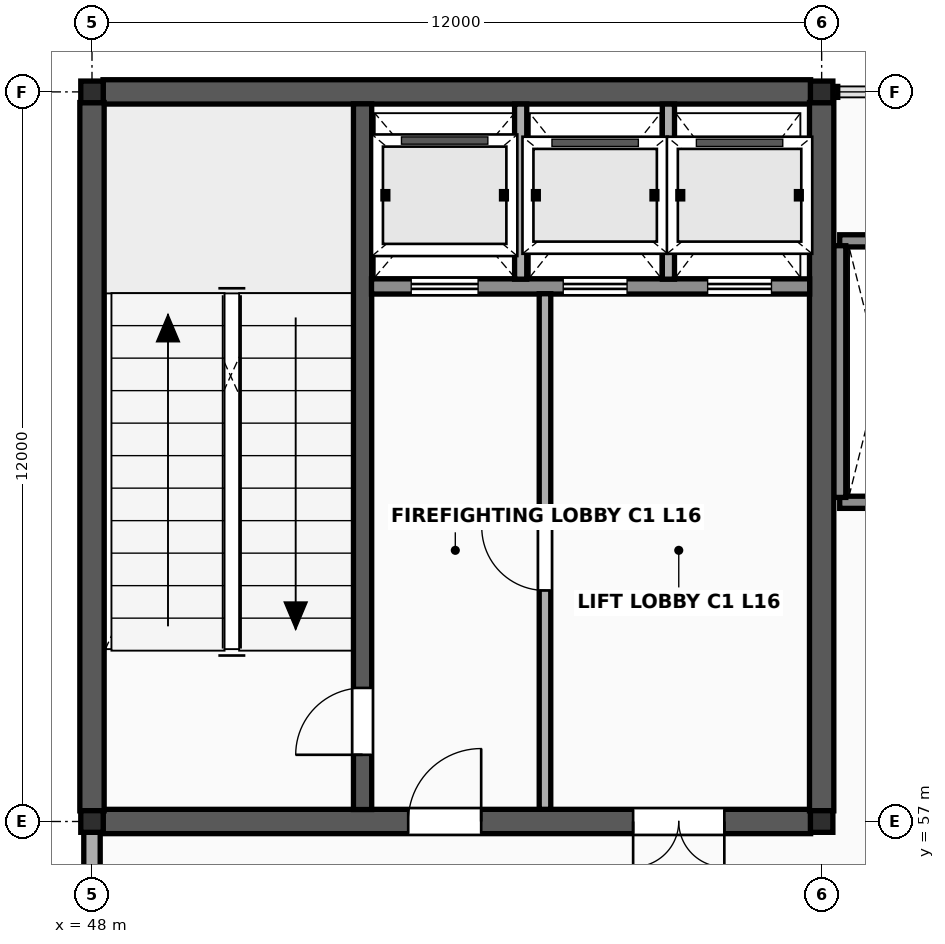
"""IFC4 building model, lengths in metres.
Left out: names, types, materials, properties, quantities, classifications, styles, units other than length and angle.
Written with IfcOpenShell. Run it as: python <this file> out.ifc"""

import sys

from ifc_helpers import new_model, si_unit, direction, frame, frame_2d, origin, origin_2d, place, context, subcontext, project, spatial, rectangle, i_section, extrude, element, fill, save


model = new_model("IFC4")
c1 = context("Model", 3, precision=1e-05, world=origin(), true_north=direction((0.0, 1.0)))
c2 = subcontext(c1, "Body", "Model", "MODEL_VIEW")
j1 = project(units=[si_unit("LENGTHUNIT", "METRE"), si_unit("PLANEANGLEUNIT", "RADIAN")], contexts=[c1])
p1 = place(None, origin())
s1 = spatial("IfcSite", under=j1, at=p1, CompositionType="ELEMENT")
p2 = place(p1, origin())
s2 = spatial("IfcBuilding", under=s1, at=p2, CompositionType="ELEMENT")
p3 = place(p2, frame((0.0, 0.0, 65.6)))
s3 = spatial("IfcBuildingStorey", under=s2, at=p3, CompositionType="ELEMENT", Elevation=65.6)
for number, where, z_axis, x_axis in (
    (1, (48.0, 57.0, 0.0), (0.0, 0.0, 1.0), (1.0, 0.0, 0.0)),
    (2, (48.0, 69.0, 0.0), (0.0, 0.0, 1.0), (1.0, 0.0, 0.0)),
    (3, (60.0, 57.0, 0.0), (0.0, 0.0, 1.0), (1.0, 0.0, 0.0)),
    (4, (60.0, 69.0, 0.0), (0.0, 0.0, 1.0), (1.0, 0.0, 0.0)),
):
    element("IfcColumn", number, at=place(p3, frame(where, z_axis=z_axis, x_axis=x_axis)), inside=s3, PredefinedType="COLUMN", context=c2, shape_type="SweptSolid", body=[
        extrude(i_section(OverallWidth=0.369, OverallDepth=0.356, WebThickness=0.011, FlangeThickness=0.018, FilletRadius=0.018, at=origin_2d()), origin(), (0.0, 0.0, 1.0), 4.0),
    ])
for number, where, z_axis, x_axis in (
    (5, (60.297, 62.25, 0.0), (0.0, 0.0, 1.0), (1.0, 0.0, 0.0)),
    (6, (60.297, 66.55, 0.0), (0.0, 0.0, 1.0), (1.0, 0.0, 0.0)),
):
    element("IfcWall", number, at=place(p3, frame(where, z_axis=z_axis, x_axis=x_axis)), inside=s3, PredefinedType="SOLIDWALL", context=c2, shape_type="SweptSolid", body=[
        extrude(rectangle(XDim=1.283, YDim=0.2, at=frame_2d((0.642, 0.0))), origin(), (0.0, 0.0, 1.0), 3.793),
    ])
p4 = place(p3, frame((60.297, 62.33, 0.0), z_axis=(0.0, 0.0, 1.0), x_axis=(0.0, 1.0, 0.0)))
e7 = element("IfcWall", 7, at=p4, inside=s3, PredefinedType="SOLIDWALL", context=c2, shape_type="SweptSolid", body=[
    extrude(rectangle(XDim=4.14, YDim=0.2, at=frame_2d((2.07, 0.0))), origin(), (0.0, 0.0, 1.0), 3.793),
])
p5 = place(p3, frame((48.181, 57.0, 0.0), z_axis=(0.0, 0.0, 1.0), x_axis=(1.0, 0.0, 0.0)))
e8 = element("IfcWall", 8, at=p5, inside=s3, PredefinedType="SHEAR", context=c2, shape_type="SweptSolid", body=[
    extrude(rectangle(XDim=11.637, YDim=0.4, at=frame_2d((5.819, 0.0))), origin(), (0.0, 0.0, 1.0), 3.793),
])
p6 = place(p5, frame((5.019, 0.0, 0.0)))
e9 = element("IfcOpeningElement", 9, at=p6, cuts=e8, PredefinedType="OPENING", context=c2, shape_type="SweptSolid", body=[
    extrude(rectangle(XDim=1.2, YDim=2.2, at=frame_2d((0.6, 1.1))), frame((0.0, 0.215, 0.0), z_axis=(0.0, -1.0, 0.0), x_axis=(1.0, 0.0, 0.0)), (0.0, 0.0, 1.0), 0.43),
])
p7 = place(p5, frame((8.718, 0.0, 0.0)))
e10 = element("IfcOpeningElement", 10, at=p7, cuts=e8, PredefinedType="OPENING", context=c2, shape_type="SweptSolid", body=[
    extrude(rectangle(XDim=1.5, YDim=2.25, at=frame_2d((0.75, 1.125))), frame((0.0, 0.215, 0.0), z_axis=(0.0, -1.0, 0.0), x_axis=(1.0, 0.0, 0.0)), (0.0, 0.0, 1.0), 0.43),
])
p8 = place(p3, frame((48.181, 69.0, 0.0), z_axis=(0.0, 0.0, 1.0), x_axis=(1.0, 0.0, 0.0)))
e11 = element("IfcWall", 11, at=p8, inside=s3, PredefinedType="SHEAR", context=c2, shape_type="SweptSolid", body=[
    extrude(rectangle(XDim=11.637, YDim=0.4, at=frame_2d((5.819, 0.0))), origin(), (0.0, 0.0, 1.0), 3.793),
])
for number, where, z_axis, x_axis in (
    (12, (48.0, 57.175, 0.0), (0.0, 0.0, 1.0), (0.0, 1.0, 0.0)),
    (13, (60.0, 57.175, 0.0), (0.0, 0.0, 1.0), (0.0, 1.0, 0.0)),
):
    element("IfcWall", number, at=place(p3, frame(where, z_axis=z_axis, x_axis=x_axis)), inside=s3, PredefinedType="SHEAR", context=c2, shape_type="SweptSolid", body=[
        extrude(rectangle(XDim=11.65, YDim=0.4, at=frame_2d((5.825, 0.0))), origin(), (0.0, 0.0, 1.0), 3.793),
    ])
p9 = place(p3, frame((52.45, 57.197, 0.0), z_axis=(0.0, 0.0, 1.0), x_axis=(0.0, 1.0, 0.0)))
e14 = element("IfcWall", 14, at=p9, inside=s3, PredefinedType="SHEAR", context=c2, shape_type="SweptSolid", body=[
    extrude(rectangle(XDim=11.606, YDim=0.3, at=frame_2d((5.803, 0.0))), origin(), (0.0, 0.0, 1.0), 3.793),
])
p10 = place(p9, frame((0.9, 0.0, 0.0)))
e15 = element("IfcOpeningElement", 15, at=p10, cuts=e14, PredefinedType="OPENING", context=c2, shape_type="SweptSolid", body=[
    extrude(rectangle(XDim=1.1, YDim=2.2, at=frame_2d((0.55, 1.1))), frame((0.0, 0.165, 0.0), z_axis=(0.0, -1.0, 0.0), x_axis=(1.0, 0.0, 0.0)), (0.0, 0.0, 1.0), 0.33),
])
p11 = place(p3, frame((52.597, 65.8, 0.0), z_axis=(0.0, 0.0, 1.0), x_axis=(1.0, 0.0, 0.0)))
e16 = element("IfcWall", 16, at=p11, inside=s3, PredefinedType="SOLIDWALL", context=c2, shape_type="SweptSolid", body=[
    extrude(rectangle(XDim=7.206, YDim=0.25, at=frame_2d((3.603, 0.0))), origin(), (0.0, 0.0, 1.0), 3.793),
])
p12 = place(p11, frame((0.653, 0.0, 0.0)))
e17 = element("IfcOpeningElement", 17, at=p12, cuts=e16, PredefinedType="OPENING", context=c2, shape_type="SweptSolid", body=[
    extrude(rectangle(XDim=1.1, YDim=2.24, at=frame_2d((0.55, 1.12))), frame((0.0, 0.14, 0.0), z_axis=(0.0, -1.0, 0.0), x_axis=(1.0, 0.0, 0.0)), (0.0, 0.0, 1.0), 0.28),
])
p13 = place(p11, frame((3.153, 0.0, 0.0)))
e18 = element("IfcOpeningElement", 18, at=p13, cuts=e16, PredefinedType="OPENING", context=c2, shape_type="SweptSolid", body=[
    extrude(rectangle(XDim=1.05, YDim=2.2, at=frame_2d((0.525, 1.1))), frame((0.0, 0.14, 0.0), z_axis=(0.0, -1.0, 0.0), x_axis=(1.0, 0.0, 0.0)), (0.0, 0.0, 1.0), 0.28),
])
p14 = place(p11, frame((5.528, 0.0, 0.0)))
e19 = element("IfcOpeningElement", 19, at=p14, cuts=e16, PredefinedType="OPENING", context=c2, shape_type="SweptSolid", body=[
    extrude(rectangle(XDim=1.05, YDim=2.2, at=frame_2d((0.525, 1.1))), frame((0.0, 0.14, 0.0), z_axis=(0.0, -1.0, 0.0), x_axis=(1.0, 0.0, 0.0)), (0.0, 0.0, 1.0), 0.28),
])
for number, where, z_axis, x_axis in (
    (20, (55.05, 65.92, 0.0), (0.0, 0.0, 1.0), (0.0, 1.0, 0.0)),
    (21, (57.48, 65.92, 0.0), (0.0, 0.0, 1.0), (0.0, 1.0, 0.0)),
):
    element("IfcWall", number, at=place(p3, frame(where, z_axis=z_axis, x_axis=x_axis)), inside=s3, PredefinedType="SOLIDWALL", context=c2, shape_type="SweptSolid", body=[
        extrude(rectangle(XDim=2.88, YDim=0.2, at=frame_2d((1.44, 0.0))), origin(), (0.0, 0.0, 1.0), 3.783),
    ])
p15 = place(p3, frame((55.45, 57.2, 0.0), z_axis=(0.0, 0.0, 1.0), x_axis=(0.0, 1.0, 0.0)))
e22 = element("IfcWall", 22, at=p15, inside=s3, PredefinedType="SOLIDWALL", context=c2, shape_type="SweptSolid", body=[
    extrude(rectangle(XDim=8.48, YDim=0.19, at=frame_2d((4.24, 0.0))), origin(), (0.0, 0.0, 1.0), 3.783),
])
p16 = place(p15, frame((3.6, 0.0, 0.0)))
e23 = element("IfcOpeningElement", 23, at=p16, cuts=e22, PredefinedType="OPENING", context=c2, shape_type="SweptSolid", body=[
    extrude(rectangle(XDim=1.04, YDim=2.18, at=frame_2d((0.52, 1.09))), frame((0.0, 0.11, 0.0), z_axis=(0.0, -1.0, 0.0), x_axis=(1.0, 0.0, 0.0)), (0.0, 0.0, 1.0), 0.22),
])
p17 = place(p3, frame((48.0, 45.176, 0.0), z_axis=(0.0, 0.0, 1.0), x_axis=(0.0, 1.0, 0.0)))
e24 = element("IfcWall", 24, at=p17, inside=s3, PredefinedType="SOLIDWALL", context=c2, shape_type="SweptSolid", body=[
    extrude(rectangle(XDim=11.648, YDim=0.27, at=frame_2d((5.824, 0.0))), origin(), (0.0, 0.0, 1.0), 3.246),
])
p18 = place(p17, frame((4.849, 0.0, 1.4)))
e25 = element("IfcOpeningElement", 25, at=p18, cuts=e24, PredefinedType="OPENING", context=c2, shape_type="SweptSolid", body=[
    extrude(rectangle(XDim=1.95, YDim=0.88, at=frame_2d((0.975, 0.44))), frame((0.0, 0.15, 0.0), z_axis=(0.0, -1.0, 0.0), x_axis=(1.0, 0.0, 0.0)), (0.0, 0.0, 1.0), 0.3),
])
p19 = place(p10, origin())
e26 = element("IfcDoor", 26, at=p19, inside=s3, OperationType="SINGLE_SWING_LEFT", PredefinedType="DOOR", context=c2, shape_type="SweptSolid", body=[
    extrude(rectangle(XDim=1.1, YDim=2.2, at=frame_2d((0.55, 1.1))), frame((0.0, 0.025, 0.0), z_axis=(0.0, -1.0, 0.0), x_axis=(1.0, 0.0, 0.0)), (0.0, 0.0, 1.0), 0.05),
])
fill(e15, e26)
p20 = place(p16, origin())
e27 = element("IfcDoor", 27, at=p20, inside=s3, OperationType="SINGLE_SWING_RIGHT", PredefinedType="DOOR", context=c2, shape_type="SweptSolid", body=[
    extrude(rectangle(XDim=1.04, YDim=2.18, at=frame_2d((0.52, 1.09))), frame((0.0, 0.025, 0.0), z_axis=(0.0, -1.0, 0.0), x_axis=(1.0, 0.0, 0.0)), (0.0, 0.0, 1.0), 0.05),
])
fill(e23, e27)
p21 = place(p6, origin())
e28 = element("IfcDoor", 28, at=p21, inside=s3, OperationType="SINGLE_SWING_RIGHT", PredefinedType="DOOR", context=c2, shape_type="SweptSolid", body=[
    extrude(rectangle(XDim=1.2, YDim=2.2, at=frame_2d((0.6, 1.1))), frame((0.0, 0.025, 0.0), z_axis=(0.0, -1.0, 0.0), x_axis=(1.0, 0.0, 0.0)), (0.0, 0.0, 1.0), 0.05),
])
fill(e9, e28)
p22 = place(p7, origin())
e29 = element("IfcDoor", 29, at=p22, inside=s3, OperationType="DOUBLE_DOOR_SINGLE_SWING", PredefinedType="DOOR", context=c2, shape_type="SweptSolid", body=[
    extrude(rectangle(XDim=1.5, YDim=2.25, at=frame_2d((0.75, 1.125))), frame((0.0, 0.025, 0.0), z_axis=(0.0, -1.0, 0.0), x_axis=(1.0, 0.0, 0.0)), (0.0, 0.0, 1.0), 0.05),
])
fill(e10, e29)
p23 = place(p12, origin())
e30 = element("IfcDoor", 30, at=p23, inside=s3, OperationType="SLIDING_TO_LEFT", PredefinedType="USERDEFINED", context=c2, shape_type="SweptSolid", body=[
    extrude(rectangle(XDim=1.1, YDim=2.24, at=frame_2d((0.55, 1.12))), frame((0.0, 0.025, 0.0), z_axis=(0.0, -1.0, 0.0), x_axis=(1.0, 0.0, 0.0)), (0.0, 0.0, 1.0), 0.05),
])
fill(e17, e30)
p24 = place(p13, origin())
e31 = element("IfcDoor", 31, at=p24, inside=s3, OperationType="SLIDING_TO_LEFT", PredefinedType="USERDEFINED", context=c2, shape_type="SweptSolid", body=[
    extrude(rectangle(XDim=1.05, YDim=2.2, at=frame_2d((0.525, 1.1))), frame((0.0, 0.025, 0.0), z_axis=(0.0, -1.0, 0.0), x_axis=(1.0, 0.0, 0.0)), (0.0, 0.0, 1.0), 0.05),
])
fill(e18, e31)
p25 = place(p14, origin())
e32 = element("IfcDoor", 32, at=p25, inside=s3, OperationType="SLIDING_TO_LEFT", PredefinedType="USERDEFINED", context=c2, shape_type="SweptSolid", body=[
    extrude(rectangle(XDim=1.05, YDim=2.2, at=frame_2d((0.525, 1.1))), frame((0.0, 0.025, 0.0), z_axis=(0.0, -1.0, 0.0), x_axis=(1.0, 0.0, 0.0)), (0.0, 0.0, 1.0), 0.05),
])
fill(e19, e32)
save(model, sys.argv[1])
